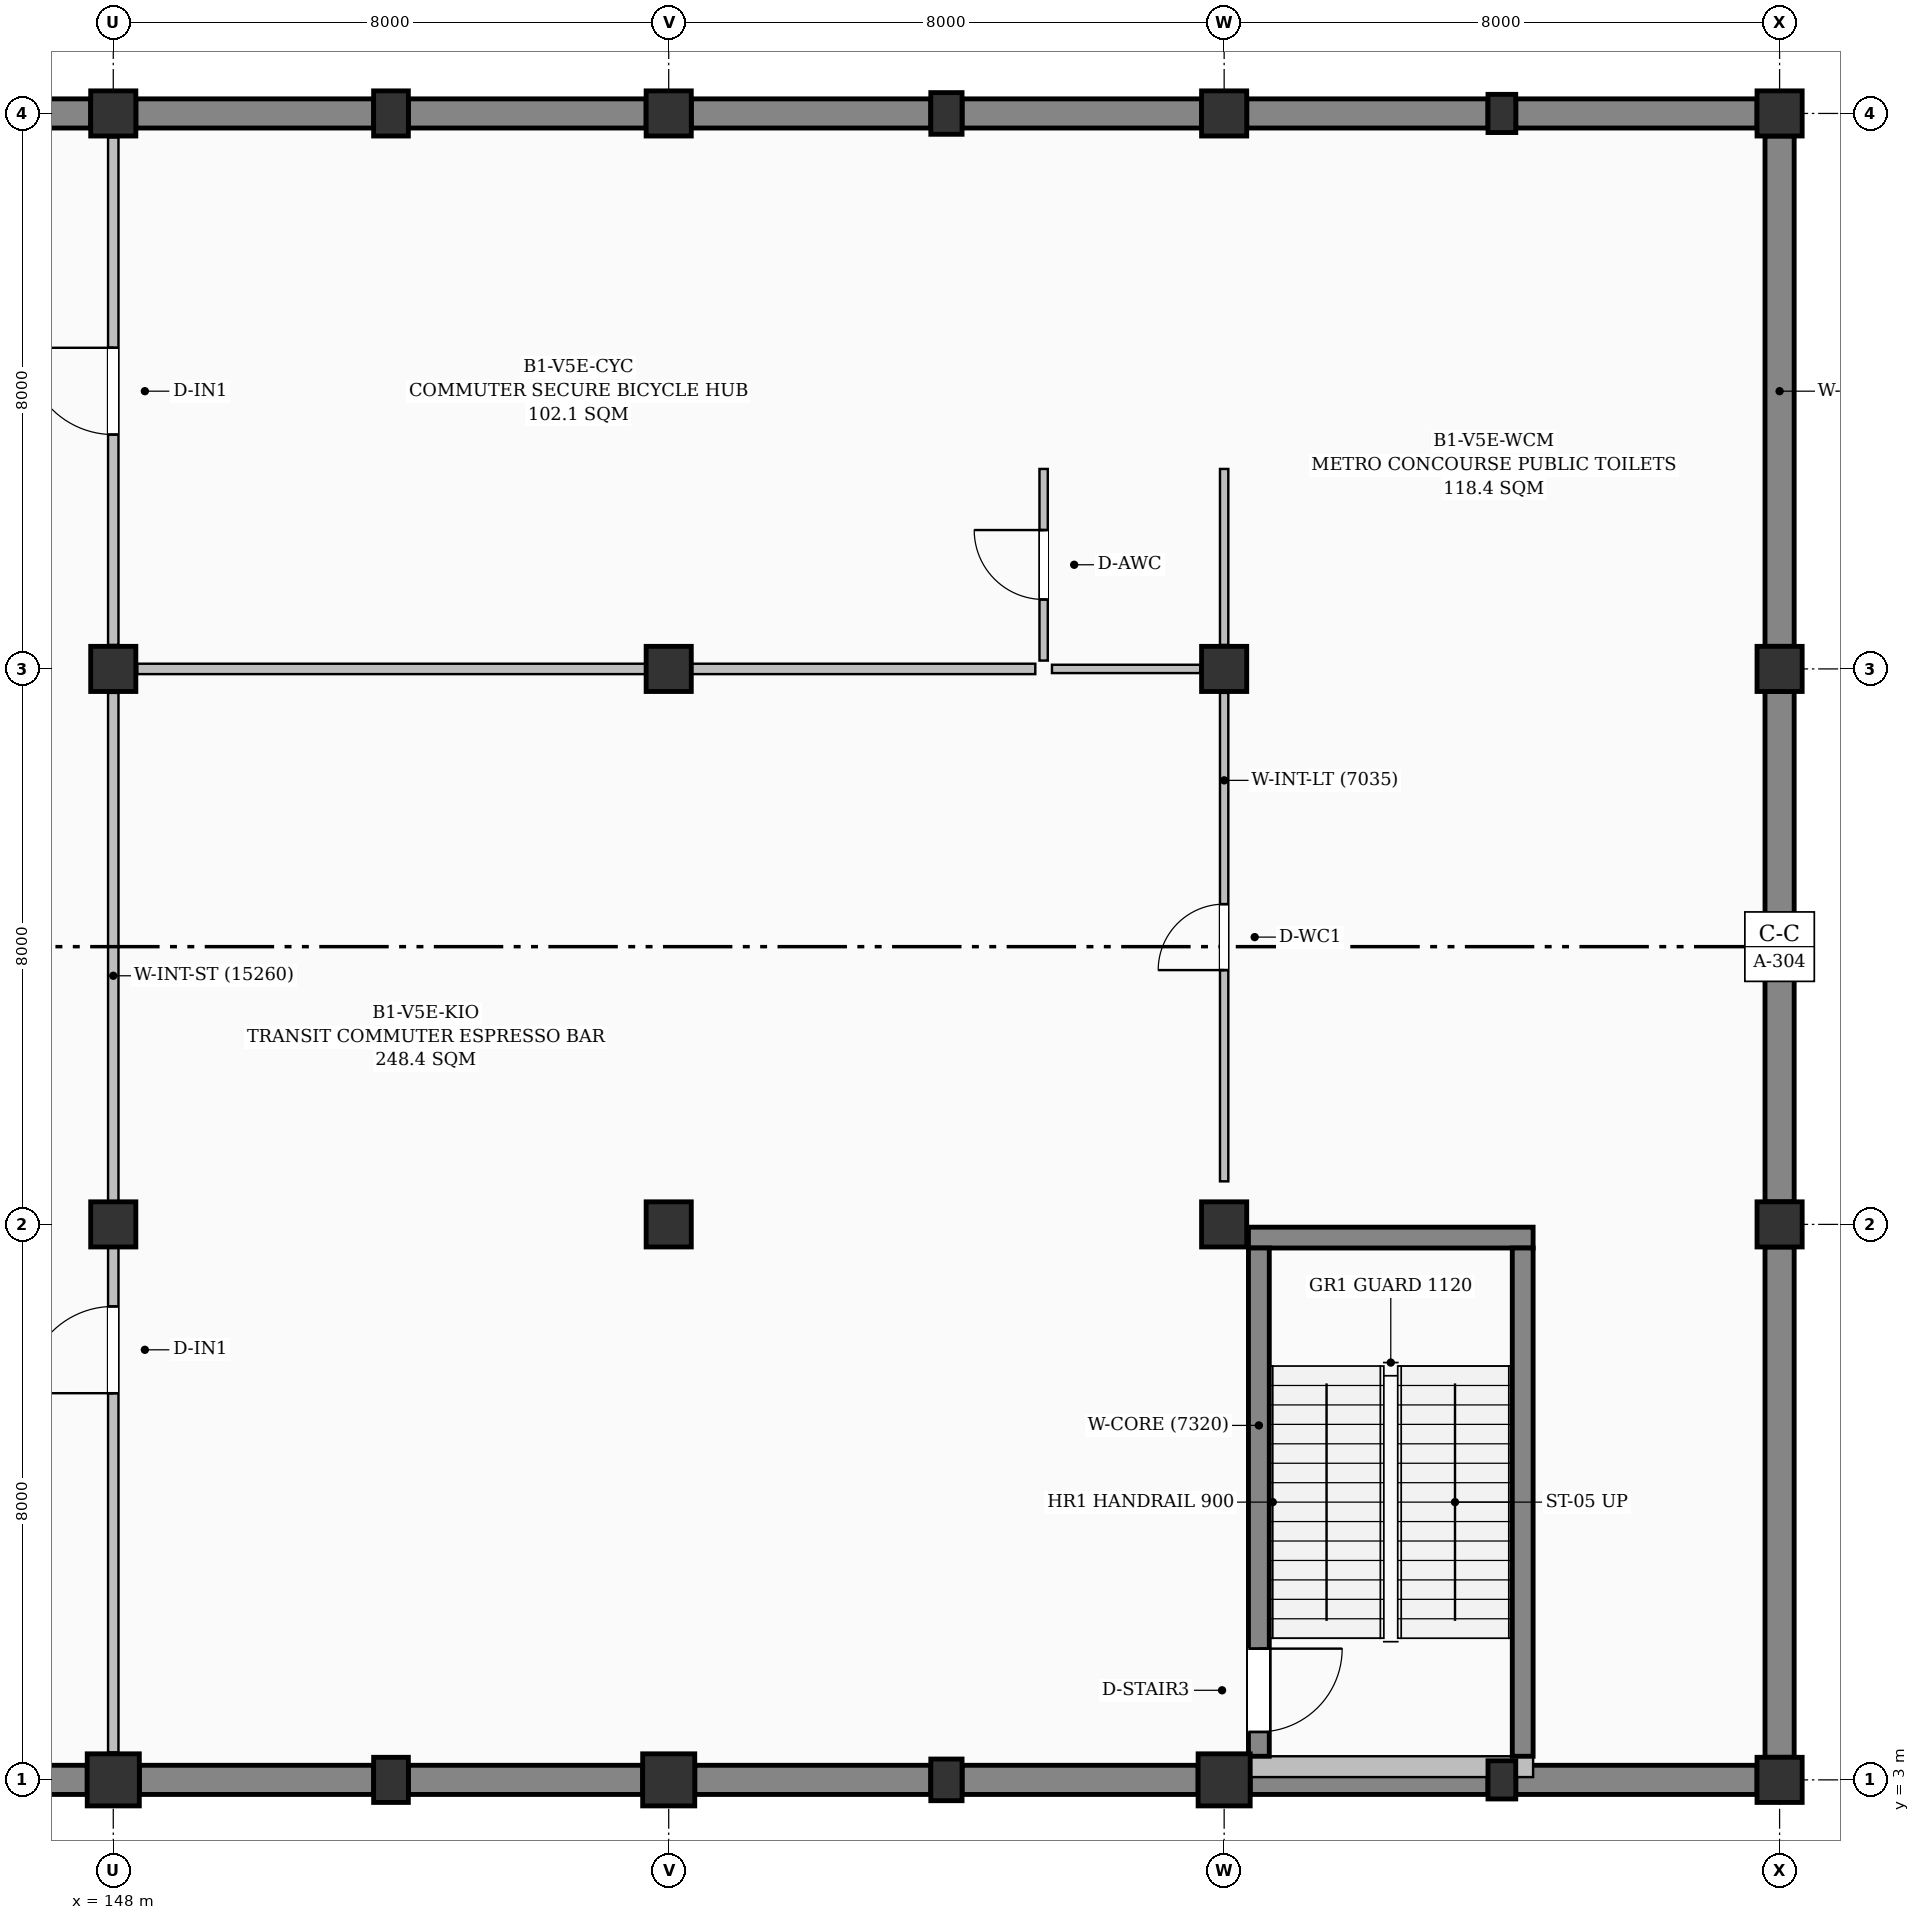
"""IFC4 building model, lengths in metres.
Left out: names, types, materials, properties, quantities, classifications, styles, units other than length and angle.
Written with IfcOpenShell. Run it as: python <this file> out.ifc"""

import sys

from ifc_helpers import new_model, si_unit, direction, frame, frame_2d, origin, origin_2d, place, context, subcontext, project, spatial, rectangle, circle, extrude, element, fill, save


model = new_model("IFC4")
c1 = context("Model", 3, precision=1e-05, world=origin(), true_north=direction((0.0, 1.0)))
c2 = subcontext(c1, "Body", "Model", "MODEL_VIEW")
j1 = project(units=[si_unit("LENGTHUNIT", "METRE"), si_unit("PLANEANGLEUNIT", "RADIAN")], contexts=[c1])
p1 = place(None, origin())
s1 = spatial("IfcSite", under=j1, at=p1, CompositionType="ELEMENT")
p2 = place(p1, origin())
s2 = spatial("IfcBuilding", under=s1, at=p2, CompositionType="ELEMENT")
p3 = place(p2, frame((0.0, 0.0, -4.8)))
s3 = spatial("IfcBuildingStorey", under=s2, at=p3, CompositionType="ELEMENT", Elevation=-4.8)
p4 = place(p3, frame((148.0, 3.0, -0.38), z_axis=(0.0, 0.0, 1.0), x_axis=(1.0, 0.0, 0.0)))
e1 = element("IfcColumn", 1, at=p4, inside=s3, PredefinedType="COLUMN", context=c2, shape_type="SweptSolid", body=[
    extrude(circle(Radius=0.375, at=origin_2d()), origin(), (0.0, 0.0, 1.0), 5.18),
])
for number, where, z_axis, x_axis in (
    (2, (148.0, 11.0, -0.38), (0.0, 0.0, 1.0), (1.0, 0.0, 0.0)),
    (3, (148.0, 19.0, -0.38), (0.0, 0.0, 1.0), (1.0, 0.0, 0.0)),
    (4, (148.0, 27.0, -0.38), (0.0, 0.0, 1.0), (1.0, 0.0, 0.0)),
):
    element("IfcColumn", number, at=place(p3, frame(where, z_axis=z_axis, x_axis=x_axis)), inside=s3, PredefinedType="COLUMN", context=c2, shape_type="SweptSolid", body=[
        extrude(rectangle(XDim=0.65, YDim=0.65, at=origin_2d()), origin(), (0.0, 0.0, 1.0), 5.18),
    ])
for number, where, z_axis, x_axis in (
    (5, (152.0, 3.0, -0.38), (0.0, 0.0, 1.0), (1.0, 0.0, 0.0)),
    (6, (152.0, 27.0, -0.38), (0.0, 0.0, 1.0), (1.0, 0.0, 0.0)),
):
    element("IfcColumn", number, at=place(p3, frame(where, z_axis=z_axis, x_axis=x_axis)), inside=s3, PredefinedType="PILASTER", context=c2, shape_type="SweptSolid", body=[
        extrude(rectangle(XDim=0.5, YDim=0.65, at=origin_2d()), origin(), (0.0, 0.0, 1.0), 5.18),
    ])
p5 = place(p3, frame((156.0, 3.0, -0.38), z_axis=(0.0, 0.0, 1.0), x_axis=(1.0, 0.0, 0.0)))
e7 = element("IfcColumn", 7, at=p5, inside=s3, PredefinedType="COLUMN", context=c2, shape_type="SweptSolid", body=[
    extrude(circle(Radius=0.375, at=origin_2d()), origin(), (0.0, 0.0, 1.0), 5.18),
])
for number, where, z_axis, x_axis in (
    (8, (156.0, 11.0, -0.38), (0.0, 0.0, 1.0), (1.0, 0.0, 0.0)),
    (9, (156.0, 19.0, -0.38), (0.0, 0.0, 1.0), (1.0, 0.0, 0.0)),
    (10, (156.0, 27.0, -0.38), (0.0, 0.0, 1.0), (1.0, 0.0, 0.0)),
):
    element("IfcColumn", number, at=place(p3, frame(where, z_axis=z_axis, x_axis=x_axis)), inside=s3, PredefinedType="COLUMN", context=c2, shape_type="SweptSolid", body=[
        extrude(rectangle(XDim=0.65, YDim=0.65, at=origin_2d()), origin(), (0.0, 0.0, 1.0), 5.18),
    ])
for number, where, z_axis, x_axis in (
    (11, (160.0, 3.0, -0.38), (0.0, 0.0, 1.0), (1.0, 0.0, 0.0)),
    (12, (160.0, 27.0, -0.38), (0.0, 0.0, 1.0), (1.0, 0.0, 0.0)),
):
    element("IfcColumn", number, at=place(p3, frame(where, z_axis=z_axis, x_axis=x_axis)), inside=s3, PredefinedType="PILASTER", context=c2, shape_type="SweptSolid", body=[
        extrude(rectangle(XDim=0.45, YDim=0.6, at=origin_2d()), origin(), (0.0, 0.0, 1.0), 5.18),
    ])
p6 = place(p3, frame((164.0, 3.0, -0.38), z_axis=(0.0, 0.0, 1.0), x_axis=(1.0, 0.0, 0.0)))
e13 = element("IfcColumn", 13, at=p6, inside=s3, PredefinedType="COLUMN", context=c2, shape_type="SweptSolid", body=[
    extrude(circle(Radius=0.375, at=origin_2d()), origin(), (0.0, 0.0, 1.0), 5.18),
])
for number, where, z_axis, x_axis in (
    (14, (164.0, 11.0, -0.38), (0.0, 0.0, 1.0), (1.0, 0.0, 0.0)),
    (15, (164.0, 19.0, -0.38), (0.0, 0.0, 1.0), (1.0, 0.0, 0.0)),
    (16, (164.0, 27.0, -0.38), (0.0, 0.0, 1.0), (1.0, 0.0, 0.0)),
):
    element("IfcColumn", number, at=place(p3, frame(where, z_axis=z_axis, x_axis=x_axis)), inside=s3, PredefinedType="COLUMN", context=c2, shape_type="SweptSolid", body=[
        extrude(rectangle(XDim=0.65, YDim=0.65, at=origin_2d()), origin(), (0.0, 0.0, 1.0), 5.18),
    ])
for number, where, z_axis, x_axis in (
    (17, (168.0, 3.0, -0.38), (0.0, 0.0, 1.0), (1.0, 0.0, 0.0)),
    (18, (168.0, 27.0, -0.38), (0.0, 0.0, 1.0), (1.0, 0.0, 0.0)),
):
    element("IfcColumn", number, at=place(p3, frame(where, z_axis=z_axis, x_axis=x_axis)), inside=s3, PredefinedType="PILASTER", context=c2, shape_type="SweptSolid", body=[
        extrude(rectangle(XDim=0.4, YDim=0.55, at=origin_2d()), origin(), (0.0, 0.0, 1.0), 5.18),
    ])
for number, where, z_axis, x_axis in (
    (19, (172.0, 3.0, -0.38), (0.0, 0.0, 1.0), (1.0, 0.0, 0.0)),
    (20, (172.0, 11.0, -0.38), (0.0, 0.0, 1.0), (1.0, 0.0, 0.0)),
    (21, (172.0, 19.0, -0.38), (0.0, 0.0, 1.0), (1.0, 0.0, 0.0)),
    (22, (172.0, 27.0, -0.38), (0.0, 0.0, 1.0), (1.0, 0.0, 0.0)),
):
    element("IfcColumn", number, at=place(p3, frame(where, z_axis=z_axis, x_axis=x_axis)), inside=s3, PredefinedType="COLUMN", context=c2, shape_type="SweptSolid", body=[
        extrude(rectangle(XDim=0.65, YDim=0.65, at=origin_2d()), origin(), (0.0, 0.0, 1.0), 5.18),
    ])
p7 = place(p3, frame((144.2, 27.0, 0.0), z_axis=(0.0, 0.0, 1.0), x_axis=(1.0, 0.0, 0.0)))
e23 = element("IfcWall", 23, at=p7, inside=s3, PredefinedType="USERDEFINED", context=c2, shape_type="SweptSolid", body=[
    extrude(rectangle(XDim=3.475, YDim=0.42, at=frame_2d((1.738, 0.0))), origin(), (0.0, 0.0, 1.0), 3.85),
])
for number, where, z_axis, x_axis in (
    (24, (148.325, 27.0, 0.0), (0.0, 0.0, 1.0), (1.0, 0.0, 0.0)),
    (25, (152.25, 27.0, 0.0), (0.0, 0.0, 1.0), (1.0, 0.0, 0.0)),
):
    element("IfcWall", number, at=place(p3, frame(where, z_axis=z_axis, x_axis=x_axis)), inside=s3, PredefinedType="USERDEFINED", context=c2, shape_type="SweptSolid", body=[
        extrude(rectangle(XDim=3.425, YDim=0.42, at=frame_2d((1.712, 0.0))), origin(), (0.0, 0.0, 1.0), 3.85),
    ])
for number, where, z_axis, x_axis in (
    (26, (156.325, 27.0, 0.0), (0.0, 0.0, 1.0), (1.0, 0.0, 0.0)),
    (27, (160.225, 27.0, 0.0), (0.0, 0.0, 1.0), (1.0, 0.0, 0.0)),
):
    element("IfcWall", number, at=place(p3, frame(where, z_axis=z_axis, x_axis=x_axis)), inside=s3, PredefinedType="USERDEFINED", context=c2, shape_type="SweptSolid", body=[
        extrude(rectangle(XDim=3.45, YDim=0.42, at=frame_2d((1.725, 0.0))), origin(), (0.0, 0.0, 1.0), 3.85),
    ])
for number, where, z_axis, x_axis in (
    (28, (164.325, 27.0, 0.0), (0.0, 0.0, 1.0), (1.0, 0.0, 0.0)),
    (29, (168.2, 27.0, 0.0), (0.0, 0.0, 1.0), (1.0, 0.0, 0.0)),
):
    element("IfcWall", number, at=place(p3, frame(where, z_axis=z_axis, x_axis=x_axis)), inside=s3, PredefinedType="USERDEFINED", context=c2, shape_type="SweptSolid", body=[
        extrude(rectangle(XDim=3.475, YDim=0.42, at=frame_2d((1.738, 0.0))), origin(), (0.0, 0.0, 1.0), 3.85),
    ])
for number, where, z_axis, x_axis in (
    (30, (172.0, 26.675, 0.0), (0.0, 0.0, 1.0), (0.0, -1.0, 0.0)),
    (31, (172.0, 18.675, 0.0), (0.0, 0.0, 1.0), (0.0, -1.0, 0.0)),
    (32, (172.0, 10.675, 0.0), (0.0, 0.0, 1.0), (0.0, -1.0, 0.0)),
):
    element("IfcWall", number, at=place(p3, frame(where, z_axis=z_axis, x_axis=x_axis)), inside=s3, PredefinedType="USERDEFINED", context=c2, shape_type="SweptSolid", body=[
        extrude(rectangle(XDim=7.35, YDim=0.42, at=frame_2d((3.675, 0.0))), origin(), (0.0, 0.0, 1.0), 3.85),
    ])
p8 = place(p3, frame((171.675, 3.0, 0.0), z_axis=(0.0, 0.0, 1.0), x_axis=(-1.0, 0.0, 0.0)))
e33 = element("IfcWall", 33, at=p8, inside=s3, PredefinedType="USERDEFINED", context=c2, shape_type="SweptSolid", body=[
    extrude(rectangle(XDim=3.475, YDim=0.42, at=frame_2d((1.738, 0.0))), origin(), (0.0, 0.0, 1.0), 3.85),
])
p9 = place(p3, frame((167.8, 3.0, 0.0), z_axis=(0.0, 0.0, 1.0), x_axis=(-1.0, 0.0, 0.0)))
e34 = element("IfcWall", 34, at=p9, inside=s3, PredefinedType="USERDEFINED", context=c2, shape_type="SweptSolid", body=[
    extrude(rectangle(XDim=3.425, YDim=0.42, at=frame_2d((1.712, 0.0))), origin(), (0.0, 0.0, 1.0), 3.85),
])
for number, where, z_axis, x_axis in (
    (35, (163.625, 3.0, 0.0), (0.0, 0.0, 1.0), (-1.0, 0.0, 0.0)),
    (36, (159.775, 3.0, 0.0), (0.0, 0.0, 1.0), (-1.0, 0.0, 0.0)),
):
    element("IfcWall", number, at=place(p3, frame(where, z_axis=z_axis, x_axis=x_axis)), inside=s3, PredefinedType="USERDEFINED", context=c2, shape_type="SweptSolid", body=[
        extrude(rectangle(XDim=3.4, YDim=0.42, at=frame_2d((1.7, 0.0))), origin(), (0.0, 0.0, 1.0), 3.85),
    ])
for number, where, z_axis, x_axis in (
    (37, (155.625, 3.0, 0.0), (0.0, 0.0, 1.0), (-1.0, 0.0, 0.0)),
    (38, (151.75, 3.0, 0.0), (0.0, 0.0, 1.0), (-1.0, 0.0, 0.0)),
):
    element("IfcWall", number, at=place(p3, frame(where, z_axis=z_axis, x_axis=x_axis)), inside=s3, PredefinedType="USERDEFINED", context=c2, shape_type="SweptSolid", body=[
        extrude(rectangle(XDim=3.375, YDim=0.42, at=frame_2d((1.688, 0.0))), origin(), (0.0, 0.0, 1.0), 3.85),
    ])
p10 = place(p3, frame((147.625, 3.0, 0.0), z_axis=(0.0, 0.0, 1.0), x_axis=(-1.0, 0.0, 0.0)))
e39 = element("IfcWall", 39, at=p10, inside=s3, PredefinedType="USERDEFINED", context=c2, shape_type="SweptSolid", body=[
    extrude(rectangle(XDim=3.425, YDim=0.42, at=frame_2d((1.712, 0.0))), origin(), (0.0, 0.0, 1.0), 3.85),
])
p11 = place(p3, frame((164.35, 3.19, 3.85), z_axis=(0.0, 0.0, 1.0), x_axis=(1.0, 0.0, 0.0)))
e40 = element("IfcWall", 40, at=p11, inside=s3, PredefinedType="SHEAR", context=c2, shape_type="SweptSolid", body=[
    extrude(rectangle(XDim=4.1, YDim=0.3, at=frame_2d((2.05, 0.0))), origin(), (0.0, 0.0, 1.0), 0.65),
])
p12 = place(p3, frame((168.45, 10.81, -0.38), z_axis=(0.0, 0.0, 1.0), x_axis=(-1.0, 0.0, 0.0)))
e41 = element("IfcWall", 41, at=p12, inside=s3, PredefinedType="SHEAR", context=c2, shape_type="SweptSolid", body=[
    extrude(rectangle(XDim=4.1, YDim=0.3, at=frame_2d((2.05, 0.0))), origin(), (0.0, 0.0, 1.0), 4.88),
])
p13 = place(p3, frame((164.5, 10.66, -0.38), z_axis=(0.0, 0.0, 1.0), x_axis=(0.0, -1.0, 0.0)))
e42 = element("IfcWall", 42, at=p13, inside=s3, PredefinedType="SHEAR", context=c2, shape_type="SweptSolid", body=[
    extrude(rectangle(XDim=7.32, YDim=0.3, at=frame_2d((3.66, 0.0))), origin(), (0.0, 0.0, 1.0), 4.88),
])
p14 = place(p13, frame((5.77, 0.0, 0.38)))
e43 = element("IfcOpeningElement", 43, at=p14, cuts=e42, PredefinedType="OPENING", context=c2, shape_type="SweptSolid", body=[
    extrude(rectangle(XDim=1.2, YDim=2.15, at=frame_2d((0.6, 1.075))), frame((0.0, 0.16, 0.0), z_axis=(0.0, -1.0, 0.0), x_axis=(1.0, 0.0, 0.0)), (0.0, 0.0, 1.0), 0.32),
])
p15 = place(p3, frame((168.3, 10.66, -0.38), z_axis=(0.0, 0.0, 1.0), x_axis=(0.0, -1.0, 0.0)))
e44 = element("IfcWall", 44, at=p15, inside=s3, PredefinedType="SHEAR", context=c2, shape_type="SweptSolid", body=[
    extrude(rectangle(XDim=7.32, YDim=0.3, at=frame_2d((3.66, 0.0))), origin(), (0.0, 0.0, 1.0), 4.88),
])
p16 = place(p3, frame((148.0, 3.395, 0.0), z_axis=(0.0, 0.0, 1.0), x_axis=(0.0, 1.0, 0.0)))
e45 = element("IfcWall", 45, at=p16, inside=s3, PredefinedType="PARTITIONING", context=c2, shape_type="SweptSolid", body=[
    extrude(rectangle(XDim=15.26, YDim=0.15, at=frame_2d((7.63, 0.0))), origin(), (0.0, 0.0, 1.0), 3.885),
])
p17 = place(p16, frame((5.174, 0.0, 0.0)))
e46 = element("IfcOpeningElement", 46, at=p17, cuts=e45, PredefinedType="OPENING", context=c2, shape_type="SweptSolid", body=[
    extrude(rectangle(XDim=1.25, YDim=2.15, at=frame_2d((0.625, 1.075))), frame((0.0, 0.085, 0.0), z_axis=(0.0, -1.0, 0.0), x_axis=(1.0, 0.0, 0.0)), (0.0, 0.0, 1.0), 0.17),
])
p18 = place(p3, frame((148.0, 19.345, 0.0), z_axis=(0.0, 0.0, 1.0), x_axis=(0.0, 1.0, 0.0)))
e47 = element("IfcWall", 47, at=p18, inside=s3, PredefinedType="PARTITIONING", context=c2, shape_type="SweptSolid", body=[
    extrude(rectangle(XDim=7.31, YDim=0.15, at=frame_2d((3.655, 0.0))), origin(), (0.0, 0.0, 1.0), 3.735),
])
p19 = place(p18, frame((3.03, 0.0, 0.0)))
e48 = element("IfcOpeningElement", 48, at=p19, cuts=e47, PredefinedType="OPENING", context=c2, shape_type="SweptSolid", body=[
    extrude(rectangle(XDim=1.25, YDim=2.15, at=frame_2d((0.625, 1.075))), frame((0.0, 0.085, 0.0), z_axis=(0.0, -1.0, 0.0), x_axis=(1.0, 0.0, 0.0)), (0.0, 0.0, 1.0), 0.17),
])
p20 = place(p3, frame((148.345, 19.0, 0.0), z_axis=(0.0, 0.0, 1.0), x_axis=(1.0, 0.0, 0.0)))
e49 = element("IfcWall", 49, at=p20, inside=s3, PredefinedType="PARTITIONING", context=c2, shape_type="SweptSolid", body=[
    extrude(rectangle(XDim=12.935, YDim=0.15, at=frame_2d((6.468, 0.0))), origin(), (0.0, 0.0, 1.0), 3.635),
])
p21 = place(p3, frame((161.52, 19.0, 0.0), z_axis=(0.0, 0.0, 1.0), x_axis=(1.0, 0.0, 0.0)))
e50 = element("IfcWall", 50, at=p21, inside=s3, PredefinedType="PARTITIONING", context=c2, shape_type="SweptSolid", body=[
    extrude(rectangle(XDim=2.135, YDim=0.12, at=frame_2d((1.067, 0.0))), origin(), (0.0, 0.0, 1.0), 3.685),
])
p22 = place(p3, frame((164.0, 11.62, 0.0), z_axis=(0.0, 0.0, 1.0), x_axis=(0.0, 1.0, 0.0)))
e51 = element("IfcWall", 51, at=p22, inside=s3, PredefinedType="PARTITIONING", context=c2, shape_type="SweptSolid", body=[
    extrude(rectangle(XDim=7.035, YDim=0.12, at=frame_2d((3.518, 0.0))), origin(), (0.0, 0.0, 1.0), 4.095),
])
p23 = place(p22, frame((3.042, 0.0, 0.0)))
e52 = element("IfcOpeningElement", 52, at=p23, cuts=e51, PredefinedType="OPENING", context=c2, shape_type="SweptSolid", body=[
    extrude(rectangle(XDim=0.95, YDim=2.1, at=frame_2d((0.475, 1.05))), frame((0.0, 0.07, 0.0), z_axis=(0.0, -1.0, 0.0), x_axis=(1.0, 0.0, 0.0)), (0.0, 0.0, 1.0), 0.14),
])
p24 = place(p3, frame((161.4, 19.12, 0.0), z_axis=(0.0, 0.0, 1.0), x_axis=(0.0, 1.0, 0.0)))
e53 = element("IfcWall", 53, at=p24, inside=s3, PredefinedType="PARTITIONING", context=c2, shape_type="SweptSolid", body=[
    extrude(rectangle(XDim=2.76, YDim=0.12, at=frame_2d((1.38, 0.0))), origin(), (0.0, 0.0, 1.0), 4.5),
])
p25 = place(p24, frame((0.88, 0.0, 0.0)))
e54 = element("IfcOpeningElement", 54, at=p25, cuts=e53, PredefinedType="OPENING", context=c2, shape_type="SweptSolid", body=[
    extrude(rectangle(XDim=1.0, YDim=2.1, at=frame_2d((0.5, 1.05))), frame((0.0, 0.07, 0.0), z_axis=(0.0, -1.0, 0.0), x_axis=(1.0, 0.0, 0.0)), (0.0, 0.0, 1.0), 0.14),
])
p26 = place(p3, frame((164.0, 19.345, 0.0), z_axis=(0.0, 0.0, 1.0), x_axis=(0.0, 1.0, 0.0)))
e55 = element("IfcWall", 55, at=p26, inside=s3, PredefinedType="PARTITIONING", context=c2, shape_type="SweptSolid", body=[
    extrude(rectangle(XDim=2.535, YDim=0.12, at=frame_2d((1.268, 0.0))), origin(), (0.0, 0.0, 1.0), 4.035),
])
p27 = place(p14, origin())
e56 = element("IfcDoor", 56, at=p27, inside=s3, OperationType="SINGLE_SWING_LEFT", PredefinedType="DOOR", context=c2, shape_type="SweptSolid", body=[
    extrude(rectangle(XDim=1.2, YDim=2.15, at=frame_2d((0.6, 1.075))), frame((0.0, 0.025, 0.0), z_axis=(0.0, -1.0, 0.0), x_axis=(1.0, 0.0, 0.0)), (0.0, 0.0, 1.0), 0.05),
])
fill(e43, e56)
p28 = place(p17, origin())
e57 = element("IfcDoor", 57, at=p28, inside=s3, OperationType="SINGLE_SWING_LEFT", PredefinedType="DOOR", context=c2, shape_type="SweptSolid", body=[
    extrude(rectangle(XDim=1.25, YDim=2.15, at=frame_2d((0.625, 1.075))), frame((0.0, 0.025, 0.0), z_axis=(0.0, -1.0, 0.0), x_axis=(1.0, 0.0, 0.0)), (0.0, 0.0, 1.0), 0.05),
])
fill(e46, e57)
p29 = place(p19, origin())
e58 = element("IfcDoor", 58, at=p29, inside=s3, OperationType="SINGLE_SWING_RIGHT", PredefinedType="DOOR", context=c2, shape_type="SweptSolid", body=[
    extrude(rectangle(XDim=1.25, YDim=2.15, at=frame_2d((0.625, 1.075))), frame((0.0, 0.025, 0.0), z_axis=(0.0, -1.0, 0.0), x_axis=(1.0, 0.0, 0.0)), (0.0, 0.0, 1.0), 0.05),
])
fill(e48, e58)
p30 = place(p23, origin())
e59 = element("IfcDoor", 59, at=p30, inside=s3, OperationType="SINGLE_SWING_LEFT", PredefinedType="DOOR", context=c2, shape_type="SweptSolid", body=[
    extrude(rectangle(XDim=0.95, YDim=2.1, at=frame_2d((0.475, 1.05))), frame((0.0, 0.025, 0.0), z_axis=(0.0, -1.0, 0.0), x_axis=(1.0, 0.0, 0.0)), (0.0, 0.0, 1.0), 0.05),
])
fill(e52, e59)
p31 = place(p25, origin())
e60 = element("IfcDoor", 60, at=p31, inside=s3, OperationType="SINGLE_SWING_RIGHT", PredefinedType="DOOR", context=c2, shape_type="SweptSolid", body=[
    extrude(rectangle(XDim=1.0, YDim=2.1, at=frame_2d((0.5, 1.05))), frame((0.0, 0.025, 0.0), z_axis=(0.0, -1.0, 0.0), x_axis=(1.0, 0.0, 0.0)), (0.0, 0.0, 1.0), 0.05),
])
fill(e54, e60)
save(model, sys.argv[1])
